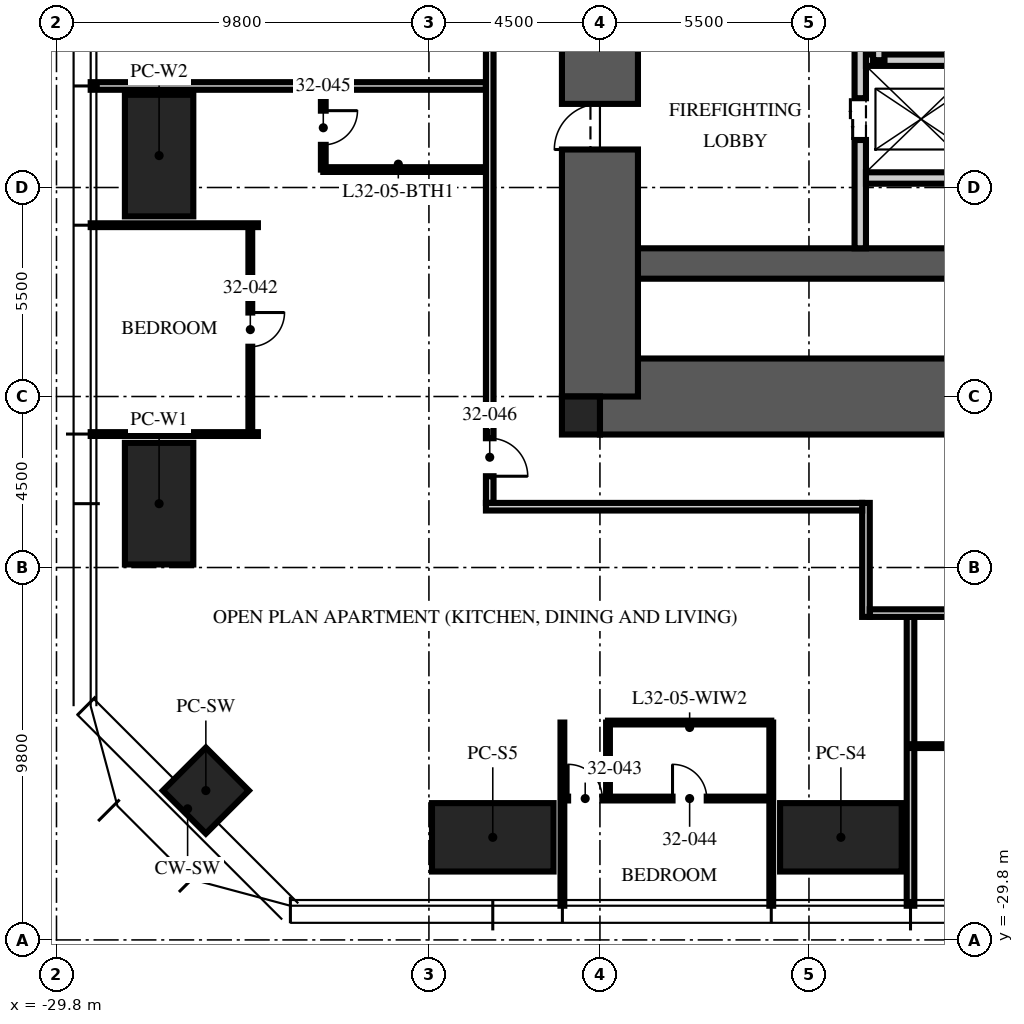
"""IFC4 building model, lengths in metres.
Left out: names, types, materials, properties, quantities, classifications, styles, units other than length and angle.
Written with IfcOpenShell. Run it as: python <this file> out.ifc"""

import sys

from ifc_helpers import new_model, si_unit, direction, frame, frame_2d, origin, origin_2d, place, context, subcontext, project, spatial, rectangle, extrude, element, fill, save


model = new_model("IFC4")
c1 = context("Model", 3, precision=1e-05, world=origin(), true_north=direction((0.0, 1.0)))
c2 = subcontext(c1, "Body", "Model", "MODEL_VIEW")
j1 = project(units=[si_unit("LENGTHUNIT", "METRE"), si_unit("PLANEANGLEUNIT", "RADIAN")], contexts=[c1])
p1 = place(None, origin())
s1 = spatial("IfcSite", under=j1, at=p1, CompositionType="ELEMENT")
p2 = place(p1, origin())
s2 = spatial("IfcBuilding", under=s1, at=p2, CompositionType="ELEMENT")
p3 = place(p2, frame((0.0, 0.0, 129.75)))
s3 = spatial("IfcBuildingStorey", under=s2, at=p3, CompositionType="ELEMENT", Elevation=129.75)
p4 = place(p3, frame((-15.5, -15.5, -0.25), z_axis=(0.0, 0.0, 1.0), x_axis=(1.0, 0.0, 0.0)))
e1 = element("IfcWall", 1, at=p4, inside=s3, PredefinedType="SHEAR", context=c2, shape_type="SweptSolid", body=[
    extrude(rectangle(XDim=31.0, YDim=2.0, at=frame_2d((15.5, 0.0))), origin(), (0.0, 0.0, 1.0), 3.75),
])
p5 = place(p4, frame((10.4, 0.0, 0.25)))
e2 = element("IfcOpeningElement", 2, at=p5, cuts=e1, PredefinedType="OPENING", context=c2, shape_type="SweptSolid", body=[
    extrude(rectangle(XDim=1.1, YDim=2.1, at=frame_2d((0.55, 1.05))), frame((0.0, 1.01, 0.0), z_axis=(0.0, -1.0, 0.0), x_axis=(1.0, 0.0, 0.0)), (0.0, 0.0, 1.0), 2.02),
])
p6 = place(p4, frame((13.5, 0.0, 0.25)))
e3 = element("IfcOpeningElement", 3, at=p6, cuts=e1, PredefinedType="OPENING", context=c2, shape_type="SweptSolid", body=[
    extrude(rectangle(XDim=1.1, YDim=2.1, at=frame_2d((0.55, 1.05))), frame((0.0, 1.01, 0.0), z_axis=(0.0, -1.0, 0.0), x_axis=(1.0, 0.0, 0.0)), (0.0, 0.0, 1.0), 2.02),
])
p7 = place(p4, frame((16.6, 0.0, 0.25)))
e4 = element("IfcOpeningElement", 4, at=p7, cuts=e1, PredefinedType="OPENING", context=c2, shape_type="SweptSolid", body=[
    extrude(rectangle(XDim=1.1, YDim=2.1, at=frame_2d((0.55, 1.05))), frame((0.0, 1.01, 0.0), z_axis=(0.0, -1.0, 0.0), x_axis=(1.0, 0.0, 0.0)), (0.0, 0.0, 1.0), 2.02),
])
p8 = place(p3, frame((-15.5, -12.0, -0.25), z_axis=(0.0, 0.0, 1.0), x_axis=(1.0, 0.0, 0.0)))
e5 = element("IfcWall", 5, at=p8, inside=s3, PredefinedType="SHEAR", context=c2, shape_type="SweptSolid", body=[
    extrude(rectangle(XDim=31.0, YDim=0.8, at=frame_2d((15.5, 0.0))), origin(), (0.0, 0.0, 1.0), 3.75),
])
p9 = place(p3, frame((-15.5, -15.5, -0.25), z_axis=(0.0, 0.0, 1.0), x_axis=(0.0, 1.0, 0.0)))
e6 = element("IfcWall", 6, at=p9, inside=s3, PredefinedType="SHEAR", context=c2, shape_type="SweptSolid", body=[
    extrude(rectangle(XDim=31.0, YDim=2.0, at=frame_2d((15.5, 0.0))), origin(), (0.0, 0.0, 1.0), 3.75),
])
p10 = place(p9, frame((6.5, 0.0, 0.25)))
e7 = element("IfcOpeningElement", 7, at=p10, cuts=e6, PredefinedType="OPENING", context=c2, shape_type="SweptSolid", body=[
    extrude(rectangle(XDim=1.2, YDim=2.1, at=frame_2d((0.6, 1.05))), frame((0.0, 1.01, 0.0), z_axis=(0.0, -1.0, 0.0), x_axis=(1.0, 0.0, 0.0)), (0.0, 0.0, 1.0), 2.02),
])
p11 = place(p9, frame((23.0, 0.0, 0.25)))
e8 = element("IfcOpeningElement", 8, at=p11, cuts=e6, PredefinedType="OPENING", context=c2, shape_type="SweptSolid", body=[
    extrude(rectangle(XDim=1.8, YDim=2.1, at=frame_2d((0.9, 1.05))), frame((0.0, 1.01, 0.0), z_axis=(0.0, -1.0, 0.0), x_axis=(1.0, 0.0, 0.0)), (0.0, 0.0, 1.0), 2.02),
])
p12 = place(p3, frame((-16.0, -16.0, -0.25), z_axis=(0.0, 0.0, 1.0), x_axis=(1.0, 0.0, 0.0)))
e9 = element("IfcColumn", 9, at=p12, inside=s3, PredefinedType="COLUMN", context=c2, shape_type="SweptSolid", body=[
    extrude(rectangle(XDim=1.0, YDim=1.0, at=origin_2d()), origin(), (0.0, 0.0, 1.0), 3.75),
])
for number, where, z_axis, x_axis in (
    (10, (-9.16, -27.1, 0.0), (0.0, 0.0, 1.0), (1.0, 0.0, 0.0)),
    (11, (-18.32, -27.1, 0.0), (0.0, 0.0, 1.0), (1.0, 0.0, 0.0)),
    (12, (-27.1, -18.32, 0.0), (0.0, 0.0, 1.0), (0.0, 1.0, 0.0)),
    (13, (-27.1, -9.16, 0.0), (0.0, 0.0, 1.0), (0.0, 1.0, 0.0)),
):
    element("IfcColumn", number, at=place(p3, frame(where, z_axis=z_axis, x_axis=x_axis)), inside=s3, PredefinedType="COLUMN", context=c2, shape_type="SweptSolid", body=[
        extrude(rectangle(XDim=3.2, YDim=1.8, at=origin_2d()), origin(), (0.0, 0.0, 1.0), 3.75),
    ])
p13 = place(p3, frame((-25.87, -25.87, 0.0), z_axis=(0.0, 0.0, 1.0), x_axis=(0.707106781187, -0.707106781187, 0.0)))
e14 = element("IfcColumn", 14, at=p13, inside=s3, PredefinedType="COLUMN", context=c2, shape_type="SweptSolid", body=[
    extrude(rectangle(XDim=1.6, YDim=1.6, at=origin_2d()), origin(), (0.0, 0.0, 1.0), 3.75),
])
p14 = place(p3, frame((-8.65, -11.6, 0.0), z_axis=(0.0, 0.0, 1.0), x_axis=(0.0, 1.0, 0.0)))
e15 = element("IfcWall", 15, at=p14, inside=s3, PredefinedType="PARTITIONING", context=c2, shape_type="SweptSolid", body=[
    extrude(rectangle(XDim=6.7, YDim=0.3, at=frame_2d((3.35, 0.0))), origin(), (0.0, 0.0, 1.0), 3.5),
])
p15 = place(p14, frame((2.85, 0.0, 0.0)))
e16 = element("IfcOpeningElement", 16, at=p15, cuts=e15, PredefinedType="OPENING", context=c2, shape_type="SweptSolid", body=[
    extrude(rectangle(XDim=1.1, YDim=2.1, at=frame_2d((0.55, 1.05))), frame((0.0, 0.16, 0.0), z_axis=(0.0, -1.0, 0.0), x_axis=(1.0, 0.0, 0.0)), (0.0, 0.0, 1.0), 0.32),
])
p16 = place(p3, frame((-8.5, -6.65, 0.0), z_axis=(0.0, 0.0, 1.0), x_axis=(1.0, 0.0, 0.0)))
e17 = element("IfcWall", 17, at=p16, inside=s3, PredefinedType="PARTITIONING", context=c2, shape_type="SweptSolid", body=[
    extrude(rectangle(XDim=17.0, YDim=0.3, at=frame_2d((8.5, 0.0))), origin(), (0.0, 0.0, 1.0), 3.5),
])
p17 = place(p16, frame((7.8, 0.0, 0.0)))
e18 = element("IfcOpeningElement", 18, at=p17, cuts=e17, PredefinedType="OPENING", context=c2, shape_type="SweptSolid", body=[
    extrude(rectangle(XDim=1.3, YDim=2.4, at=frame_2d((0.65, 1.2))), frame((0.0, 0.16, 0.0), z_axis=(0.0, -1.0, 0.0), x_axis=(1.0, 0.0, 0.0)), (0.0, 0.0, 1.0), 0.32),
])
p18 = place(p16, frame((5.65, 0.0, 0.0)))
e19 = element("IfcOpeningElement", 19, at=p18, cuts=e17, PredefinedType="OPENING", context=c2, shape_type="SweptSolid", body=[
    extrude(rectangle(XDim=0.9, YDim=2.1, at=frame_2d((0.45, 1.05))), frame((0.0, 0.16, 0.0), z_axis=(0.0, -1.0, 0.0), x_axis=(1.0, 0.0, 0.0)), (0.0, 0.0, 1.0), 0.32),
])
p19 = place(p16, frame((10.4, 0.0, 0.0)))
e20 = element("IfcOpeningElement", 20, at=p19, cuts=e17, PredefinedType="OPENING", context=c2, shape_type="SweptSolid", body=[
    extrude(rectangle(XDim=0.9, YDim=2.1, at=frame_2d((0.45, 1.05))), frame((0.0, 0.16, 0.0), z_axis=(0.0, -1.0, 0.0), x_axis=(1.0, 0.0, 0.0)), (0.0, 0.0, 1.0), 0.32),
])
p20 = place(p3, frame((-8.5, -9.75, 0.0), z_axis=(0.0, 0.0, 1.0), x_axis=(1.0, 0.0, 0.0)))
e21 = element("IfcWall", 21, at=p20, inside=s3, PredefinedType="PARTITIONING", context=c2, shape_type="SweptSolid", body=[
    extrude(rectangle(XDim=2.9, YDim=0.3, at=frame_2d((1.45, 0.0))), origin(), (0.0, 0.0, 1.0), 3.5),
])
p21 = place(p3, frame((-8.163, -6.65, 0.0), z_axis=(0.0, 0.0, 1.0), x_axis=(0.0, 1.0, 0.0)))
e22 = element("IfcWall", 22, at=p21, inside=s3, PredefinedType="PARTITIONING", context=c2, shape_type="SweptSolid", body=[
    extrude(rectangle(XDim=7.45, YDim=0.3, at=frame_2d((3.725, 0.0))), origin(), (0.0, 0.0, 1.0), 3.5),
])
p22 = place(p3, frame((-18.5, -7.328, 0.0), z_axis=(0.0, 0.0, 1.0), x_axis=(-1.0, 0.0, 0.0)))
e23 = element("IfcWall", 23, at=p22, inside=s3, PredefinedType="PARTITIONING", context=c2, shape_type="SweptSolid", body=[
    extrude(rectangle(XDim=10.4, YDim=0.2, at=frame_2d((5.2, 0.0))), origin(), (0.0, 0.0, 1.0), 2.81),
])
for number, where, z_axis, x_axis in (
    (24, (-24.5, -10.992, 0.0), (0.0, 0.0, 1.0), (-1.0, 0.0, 0.0)),
    (25, (-24.5, -16.488, 0.0), (0.0, 0.0, 1.0), (-1.0, 0.0, 0.0)),
):
    element("IfcWall", number, at=place(p3, frame(where, z_axis=z_axis, x_axis=x_axis)), inside=s3, PredefinedType="PARTITIONING", context=c2, shape_type="SweptSolid", body=[
        extrude(rectangle(XDim=4.4, YDim=0.1, at=frame_2d((2.2, 0.0))), origin(), (0.0, 0.0, 1.0), 2.81),
    ])
for number, where, z_axis, x_axis in (
    (26, (-16.488, -24.08, 0.0), (0.0, 0.0, 1.0), (0.0, -1.0, 0.0)),
    (27, (-10.992, -24.08, 0.0), (0.0, 0.0, 1.0), (0.0, -1.0, 0.0)),
):
    element("IfcWall", number, at=place(p3, frame(where, z_axis=z_axis, x_axis=x_axis)), inside=s3, PredefinedType="PARTITIONING", context=c2, shape_type="SweptSolid", body=[
        extrude(rectangle(XDim=4.82, YDim=0.1, at=frame_2d((2.41, 0.0))), origin(), (0.0, 0.0, 1.0), 2.81),
    ])
p23 = place(p3, frame((-7.328, -21.3, 0.0), z_axis=(0.0, 0.0, 1.0), x_axis=(0.0, -1.0, 0.0)))
e28 = element("IfcWall", 28, at=p23, inside=s3, PredefinedType="PARTITIONING", context=c2, shape_type="SweptSolid", body=[
    extrude(rectangle(XDim=7.6, YDim=0.2, at=frame_2d((3.8, 0.0))), origin(), (0.0, 0.0, 1.0), 2.81),
])
p24 = place(p3, frame((-24.7, -10.992, 0.0), z_axis=(0.0, 0.0, 1.0), x_axis=(0.0, -1.0, 0.0)))
e29 = element("IfcWall", 29, at=p24, inside=s3, PredefinedType="PARTITIONING", context=c2, shape_type="SweptSolid", body=[
    extrude(rectangle(XDim=5.496, YDim=0.1, at=frame_2d((2.748, 0.0))), origin(), (0.0, 0.0, 1.0), 2.81),
])
p25 = place(p24, frame((2.298, 0.0, 0.0)))
e30 = element("IfcOpeningElement", 30, at=p25, cuts=e29, PredefinedType="OPENING", context=c2, shape_type="SweptSolid", body=[
    extrude(rectangle(XDim=0.9, YDim=2.1, at=frame_2d((0.45, 1.05))), frame((0.0, 0.06, 0.0), z_axis=(0.0, -1.0, 0.0), x_axis=(1.0, 0.0, 0.0)), (0.0, 0.0, 1.0), 0.12),
])
p26 = place(p3, frame((-16.488, -26.08, 0.0), z_axis=(0.0, 0.0, 1.0), x_axis=(1.0, 0.0, 0.0)))
e31 = element("IfcWall", 31, at=p26, inside=s3, PredefinedType="PARTITIONING", context=c2, shape_type="SweptSolid", body=[
    extrude(rectangle(XDim=5.496, YDim=0.1, at=frame_2d((2.748, 0.0))), origin(), (0.0, 0.0, 1.0), 2.81),
])
p27 = place(p26, frame((0.15, 0.0, 0.0)))
e32 = element("IfcOpeningElement", 32, at=p27, cuts=e31, PredefinedType="OPENING", context=c2, shape_type="SweptSolid", body=[
    extrude(rectangle(XDim=0.9, YDim=2.1, at=frame_2d((0.45, 1.05))), frame((0.0, 0.06, 0.0), z_axis=(0.0, -1.0, 0.0), x_axis=(1.0, 0.0, 0.0)), (0.0, 0.0, 1.0), 0.12),
])
p28 = place(p26, frame((2.898, 0.0, 0.0)))
e33 = element("IfcOpeningElement", 33, at=p28, cuts=e31, PredefinedType="OPENING", context=c2, shape_type="SweptSolid", body=[
    extrude(rectangle(XDim=0.9, YDim=2.1, at=frame_2d((0.45, 1.05))), frame((0.0, 0.06, 0.0), z_axis=(0.0, -1.0, 0.0), x_axis=(1.0, 0.0, 0.0)), (0.0, 0.0, 1.0), 0.12),
])
p29 = place(p3, frame((-15.288, -24.08, 0.0), z_axis=(0.0, 0.0, 1.0), x_axis=(0.0, -1.0, 0.0)))
e34 = element("IfcWall", 34, at=p29, inside=s3, PredefinedType="PARTITIONING", context=c2, shape_type="SweptSolid", body=[
    extrude(rectangle(XDim=2.0, YDim=0.1, at=frame_2d((1.0, 0.0))), origin(), (0.0, 0.0, 1.0), 3.5),
])
p30 = place(p3, frame((-15.288, -24.08, 0.0), z_axis=(0.0, 0.0, 1.0), x_axis=(1.0, 0.0, 0.0)))
e35 = element("IfcWall", 35, at=p30, inside=s3, PredefinedType="PARTITIONING", context=c2, shape_type="SweptSolid", body=[
    extrude(rectangle(XDim=4.296, YDim=0.1, at=frame_2d((2.148, 0.0))), origin(), (0.0, 0.0, 1.0), 2.81),
])
p31 = place(p3, frame((-22.78, -7.328, 0.0), z_axis=(0.0, 0.0, 1.0), x_axis=(0.0, -1.0, 0.0)))
e36 = element("IfcWall", 36, at=p31, inside=s3, PredefinedType="PARTITIONING", context=c2, shape_type="SweptSolid", body=[
    extrude(rectangle(XDim=2.2, YDim=0.125, at=frame_2d((1.1, 0.0))), origin(), (0.0, 0.0, 1.0), 2.7),
])
p32 = place(p31, frame((0.65, 0.0, 0.0)))
e37 = element("IfcOpeningElement", 37, at=p32, cuts=e36, PredefinedType="OPENING", context=c2, shape_type="SweptSolid", body=[
    extrude(rectangle(XDim=0.9, YDim=2.1, at=frame_2d((0.45, 1.05))), frame((0.0, 0.073, 0.0), z_axis=(0.0, -1.0, 0.0), x_axis=(1.0, 0.0, 0.0)), (0.0, 0.0, 1.0), 0.145),
])
p33 = place(p3, frame((-18.5, -9.528, 0.0), z_axis=(0.0, 0.0, 1.0), x_axis=(-1.0, 0.0, 0.0)))
e38 = element("IfcWall", 38, at=p33, inside=s3, PredefinedType="PARTITIONING", context=c2, shape_type="SweptSolid", body=[
    extrude(rectangle(XDim=4.28, YDim=0.125, at=frame_2d((2.14, 0.0))), origin(), (0.0, 0.0, 1.0), 3.5),
])
p34 = place(p3, frame((-7.328, -24.7, 0.0), z_axis=(0.0, 0.0, 1.0), x_axis=(1.0, 0.0, 0.0)))
e39 = element("IfcWall", 39, at=p34, inside=s3, PredefinedType="PARTITIONING", context=c2, shape_type="SweptSolid", body=[
    extrude(rectangle(XDim=5.496, YDim=0.1, at=frame_2d((2.748, 0.0))), origin(), (0.0, 0.0, 1.0), 2.81),
])
p35 = place(p34, frame((2.298, 0.0, 0.0)))
e40 = element("IfcOpeningElement", 40, at=p35, cuts=e39, PredefinedType="OPENING", context=c2, shape_type="SweptSolid", body=[
    extrude(rectangle(XDim=0.9, YDim=2.1, at=frame_2d((0.45, 1.05))), frame((0.0, 0.06, 0.0), z_axis=(0.0, -1.0, 0.0), x_axis=(1.0, 0.0, 0.0)), (0.0, 0.0, 1.0), 0.12),
])
p36 = place(p3, frame((-18.4, 5.328, 0.0), z_axis=(0.0, 0.0, 1.0), x_axis=(0.0, -1.0, 0.0)))
e41 = element("IfcWall", 41, at=p36, inside=s3, PredefinedType="PARTITIONING", context=c2, shape_type="SweptSolid", body=[
    extrude(rectangle(XDim=23.628, YDim=0.2, at=frame_2d((11.814, 0.0))), origin(), (0.0, 0.0, 1.0), 2.3),
])
p37 = place(p36, frame((21.926, 0.0, 0.0)))
e42 = element("IfcOpeningElement", 42, at=p37, cuts=e41, PredefinedType="OPENING", context=c2, shape_type="SweptSolid", body=[
    extrude(rectangle(XDim=1.0, YDim=2.2, at=frame_2d((0.5, 1.1))), frame((0.0, 0.11, 0.0), z_axis=(0.0, -1.0, 0.0), x_axis=(1.0, 0.0, 0.0)), (0.0, 0.0, 1.0), 0.22),
])
p38 = place(p3, frame((-8.5, -18.3, 0.0), z_axis=(0.0, 0.0, 1.0), x_axis=(0.0, -1.0, 0.0)))
e43 = element("IfcWall", 43, at=p38, inside=s3, PredefinedType="PARTITIONING", context=c2, shape_type="SweptSolid", body=[
    extrude(rectangle(XDim=3.0, YDim=0.2, at=frame_2d((1.5, 0.0))), origin(), (0.0, 0.0, 1.0), 3.5),
])
p39 = place(p3, frame((5.4, -21.2, 0.0), z_axis=(0.0, 0.0, 1.0), x_axis=(-1.0, 0.0, 0.0)))
e44 = element("IfcWall", 44, at=p39, inside=s3, PredefinedType="PARTITIONING", context=c2, shape_type="SweptSolid", body=[
    extrude(rectangle(XDim=13.8, YDim=0.2, at=frame_2d((6.9, 0.0))), origin(), (0.0, 0.0, 1.0), 2.7),
])
p40 = place(p39, frame((0.958, 0.0, 0.0)))
e45 = element("IfcOpeningElement", 45, at=p40, cuts=e44, PredefinedType="OPENING", context=c2, shape_type="SweptSolid", body=[
    extrude(rectangle(XDim=1.0, YDim=2.2, at=frame_2d((0.5, 1.1))), frame((0.0, 0.11, 0.0), z_axis=(0.0, -1.0, 0.0), x_axis=(1.0, 0.0, 0.0)), (0.0, 0.0, 1.0), 0.22),
])
p41 = place(p3, frame((-8.6, -18.4, 0.0), z_axis=(0.0, 0.0, 1.0), x_axis=(-1.0, 0.0, 0.0)))
e46 = element("IfcWall", 46, at=p41, inside=s3, PredefinedType="PARTITIONING", context=c2, shape_type="SweptSolid", body=[
    extrude(rectangle(XDim=9.9, YDim=0.2, at=frame_2d((4.95, 0.0))), origin(), (0.0, 0.0, 1.0), 2.3),
])
p42 = place(p10, origin())
e47 = element("IfcDoor", 47, at=p42, inside=s3, OperationType="SINGLE_SWING_LEFT", PredefinedType="DOOR", context=c2, shape_type="SweptSolid", body=[
    extrude(rectangle(XDim=1.2, YDim=2.1, at=frame_2d((0.6, 1.05))), frame((0.0, 0.025, 0.0), z_axis=(0.0, -1.0, 0.0), x_axis=(1.0, 0.0, 0.0)), (0.0, 0.0, 1.0), 0.05),
])
fill(e7, e47)
p43 = place(p15, origin())
e48 = element("IfcDoor", 48, at=p43, inside=s3, OperationType="DOUBLE_DOOR_SLIDING", PredefinedType="DOOR", context=c2, shape_type="SweptSolid", body=[
    extrude(rectangle(XDim=1.1, YDim=2.1, at=frame_2d((0.55, 1.05))), frame((0.0, 0.025, 0.0), z_axis=(0.0, -1.0, 0.0), x_axis=(1.0, 0.0, 0.0)), (0.0, 0.0, 1.0), 0.05),
])
fill(e16, e48)
p44 = place(p25, origin())
e49 = element("IfcDoor", 49, at=p44, inside=s3, OperationType="SINGLE_SWING_LEFT", PredefinedType="DOOR", context=c2, shape_type="SweptSolid", body=[
    extrude(rectangle(XDim=0.9, YDim=2.1, at=frame_2d((0.45, 1.05))), frame((0.0, 0.025, 0.0), z_axis=(0.0, -1.0, 0.0), x_axis=(1.0, 0.0, 0.0)), (0.0, 0.0, 1.0), 0.05),
])
fill(e30, e49)
p45 = place(p27, origin())
e50 = element("IfcDoor", 50, at=p45, inside=s3, OperationType="SINGLE_SWING_LEFT", PredefinedType="DOOR", context=c2, shape_type="SweptSolid", body=[
    extrude(rectangle(XDim=0.9, YDim=2.1, at=frame_2d((0.45, 1.05))), frame((0.0, 0.025, 0.0), z_axis=(0.0, -1.0, 0.0), x_axis=(1.0, 0.0, 0.0)), (0.0, 0.0, 1.0), 0.05),
])
fill(e32, e50)
p46 = place(p28, origin())
e51 = element("IfcDoor", 51, at=p46, inside=s3, OperationType="SINGLE_SWING_LEFT", PredefinedType="DOOR", context=c2, shape_type="SweptSolid", body=[
    extrude(rectangle(XDim=0.9, YDim=2.1, at=frame_2d((0.45, 1.05))), frame((0.0, 0.025, 0.0), z_axis=(0.0, -1.0, 0.0), x_axis=(1.0, 0.0, 0.0)), (0.0, 0.0, 1.0), 0.05),
])
fill(e33, e51)
p47 = place(p32, origin())
e52 = element("IfcDoor", 52, at=p47, inside=s3, OperationType="SINGLE_SWING_LEFT", PredefinedType="DOOR", context=c2, shape_type="SweptSolid", body=[
    extrude(rectangle(XDim=0.9, YDim=2.1, at=frame_2d((0.45, 1.05))), frame((0.0, 0.025, 0.0), z_axis=(0.0, -1.0, 0.0), x_axis=(1.0, 0.0, 0.0)), (0.0, 0.0, 1.0), 0.05),
])
fill(e37, e52)
p48 = place(p37, origin())
e53 = element("IfcDoor", 53, at=p48, inside=s3, OperationType="SINGLE_SWING_RIGHT", PredefinedType="DOOR", context=c2, shape_type="SweptSolid", body=[
    extrude(rectangle(XDim=1.0, YDim=2.2, at=frame_2d((0.5, 1.1))), frame((0.0, 0.025, 0.0), z_axis=(0.0, -1.0, 0.0), x_axis=(1.0, 0.0, 0.0)), (0.0, 0.0, 1.0), 0.05),
])
fill(e42, e53)
save(model, sys.argv[1])
